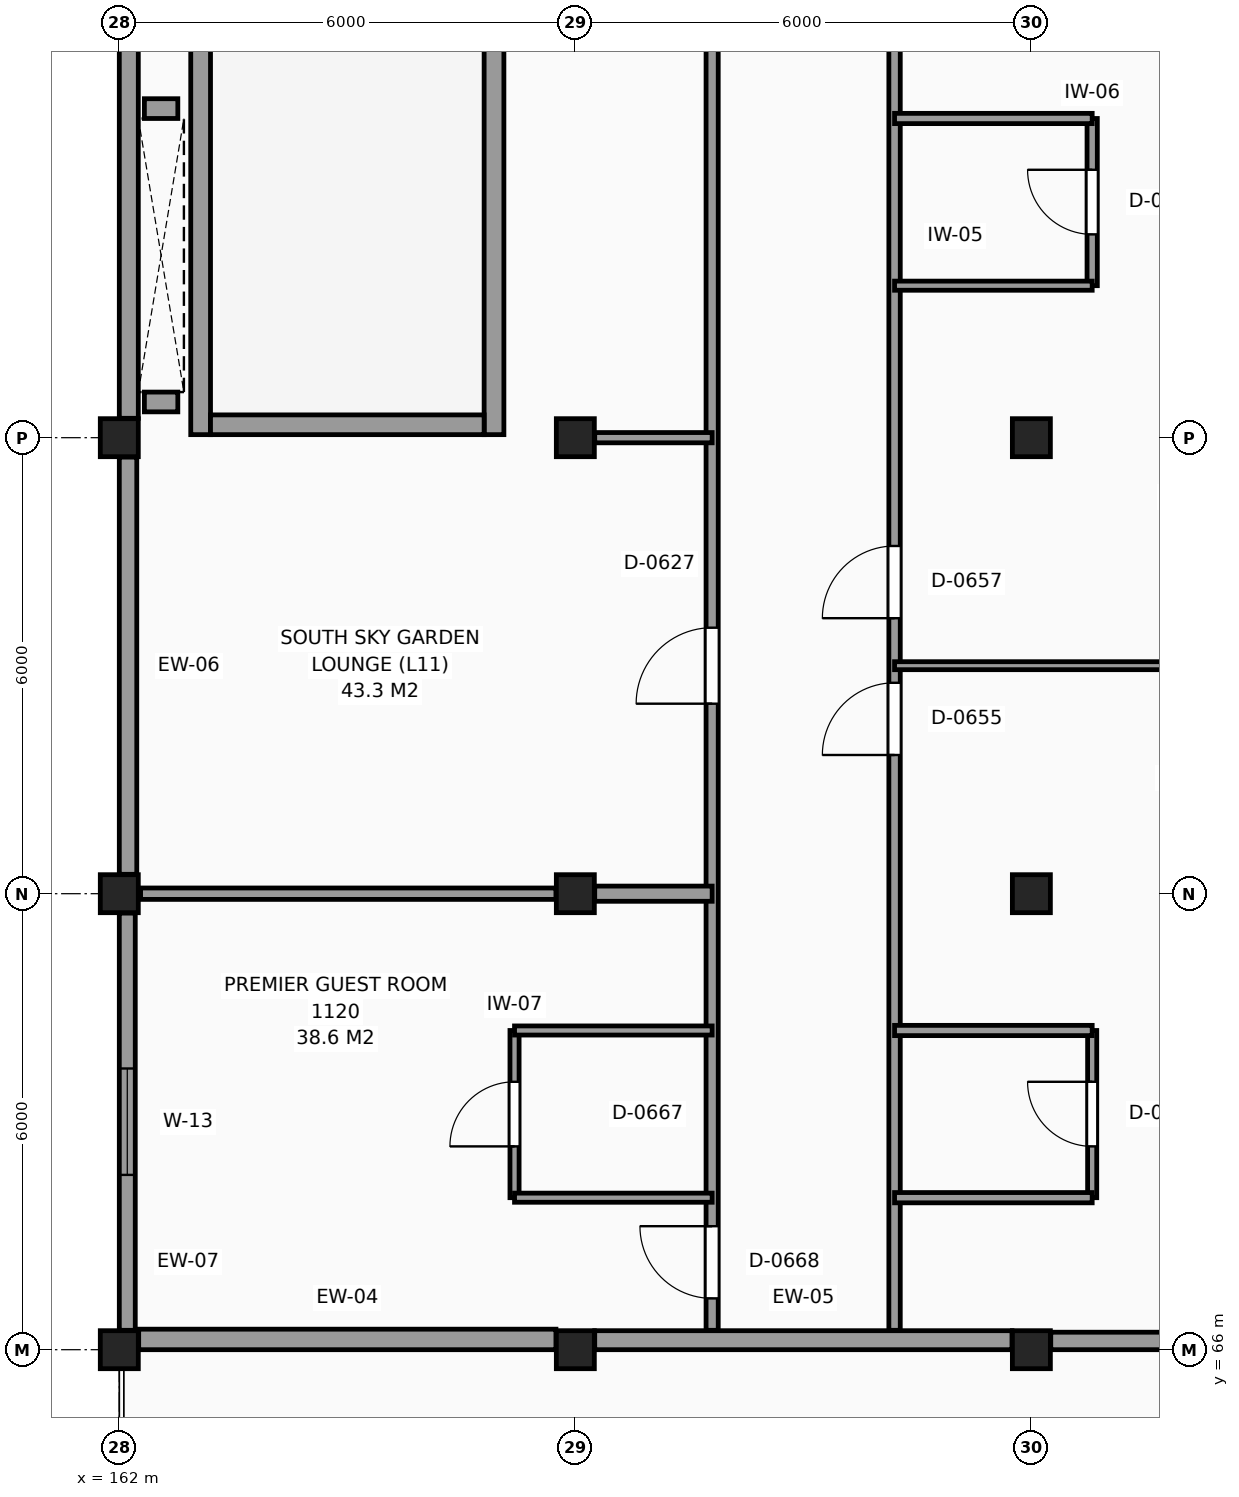
"""IFC4 building model, lengths in metres.
Left out: names, types, materials, properties, quantities, classifications, styles, units other than length and angle.
Written with IfcOpenShell. Run it as: python <this file> out.ifc"""

import sys

from ifc_helpers import new_model, si_unit, direction, frame, frame_2d, origin, origin_2d, place, context, subcontext, project, spatial, rectangle, extrude, element, fill, save


model = new_model("IFC4")
c1 = context("Model", 3, precision=1e-05, world=origin(), true_north=direction((0.0, 1.0)))
c2 = subcontext(c1, "Body", "Model", "MODEL_VIEW")
j1 = project(units=[si_unit("LENGTHUNIT", "METRE"), si_unit("PLANEANGLEUNIT", "RADIAN")], contexts=[c1])
p1 = place(None, origin())
s1 = spatial("IfcSite", under=j1, at=p1, CompositionType="ELEMENT")
p2 = place(p1, origin())
s2 = spatial("IfcBuilding", under=s1, at=p2, CompositionType="ELEMENT")
p3 = place(p2, frame((0.0, 0.0, 44.7)))
s3 = spatial("IfcBuildingStorey", under=s2, at=p3, CompositionType="ELEMENT", Elevation=44.7)
for number, where, z_axis, x_axis in (
    (1, (162.0, 66.0, 0.0), (0.0, 0.0, 1.0), (1.0, 0.0, 0.0)),
    (2, (162.0, 72.0, 0.0), (0.0, 0.0, 1.0), (1.0, 0.0, 0.0)),
    (3, (162.0, 78.0, 0.0), (0.0, 0.0, 1.0), (1.0, 0.0, 0.0)),
    (4, (168.0, 66.0, 0.0), (0.0, 0.0, 1.0), (1.0, 0.0, 0.0)),
    (5, (168.0, 72.0, 0.0), (0.0, 0.0, 1.0), (1.0, 0.0, 0.0)),
    (6, (168.0, 78.0, 0.0), (0.0, 0.0, 1.0), (1.0, 0.0, 0.0)),
    (7, (174.0, 66.0, 0.0), (0.0, 0.0, 1.0), (1.0, 0.0, 0.0)),
    (8, (174.0, 72.0, 0.0), (0.0, 0.0, 1.0), (1.0, 0.0, 0.0)),
    (9, (174.0, 78.0, 0.0), (0.0, 0.0, 1.0), (1.0, 0.0, 0.0)),
):
    element("IfcColumn", number, at=place(p3, frame(where, z_axis=z_axis, x_axis=x_axis)), inside=s3, PredefinedType="COLUMN", context=c2, shape_type="SweptSolid", body=[
        extrude(rectangle(XDim=0.5, YDim=0.5, at=origin_2d()), origin(), (0.0, 0.0, 1.0), 3.3),
    ])
p4 = place(p3, frame((162.125, 83.745, 0.0), z_axis=(0.0, 0.0, 1.0), x_axis=(0.0, -1.0, 0.0)))
e10 = element("IfcWall", 10, at=p4, inside=s3, PredefinedType="SOLIDWALL", context=c2, shape_type="SweptSolid", body=[
    extrude(rectangle(XDim=5.49, YDim=0.25, at=frame_2d((2.745, 0.0))), origin(), (0.0, 0.0, 1.0), 3.05),
])
p5 = place(p3, frame((162.115, 77.745, 0.0), z_axis=(0.0, 0.0, 1.0), x_axis=(0.0, -1.0, 0.0)))
e11 = element("IfcWall", 11, at=p5, inside=s3, PredefinedType="SOLIDWALL", context=c2, shape_type="SweptSolid", body=[
    extrude(rectangle(XDim=5.49, YDim=0.23, at=frame_2d((2.745, 0.0))), origin(), (0.0, 0.0, 1.0), 2.4),
])
p6 = place(p3, frame((162.105, 71.745, 0.0), z_axis=(0.0, 0.0, 1.0), x_axis=(0.0, -1.0, 0.0)))
e12 = element("IfcWall", 12, at=p6, inside=s3, PredefinedType="SOLIDWALL", context=c2, shape_type="SweptSolid", body=[
    extrude(rectangle(XDim=5.49, YDim=0.21, at=frame_2d((2.745, 0.0))), origin(), (0.0, 0.0, 1.0), 2.4),
])
p7 = place(p6, frame((2.045, 0.0, 0.8)))
e13 = element("IfcOpeningElement", 13, at=p7, cuts=e12, PredefinedType="OPENING", context=c2, shape_type="SweptSolid", body=[
    extrude(rectangle(XDim=1.4, YDim=1.4, at=frame_2d((0.7, 0.7))), frame((0.0, 0.115, 0.0), z_axis=(0.0, -1.0, 0.0), x_axis=(1.0, 0.0, 0.0)), (0.0, 0.0, 1.0), 0.23),
])
p8 = place(p3, frame((162.255, 66.135, 0.0), z_axis=(0.0, 0.0, 1.0), x_axis=(1.0, 0.0, 0.0)))
e14 = element("IfcWall", 14, at=p8, inside=s3, PredefinedType="SOLIDWALL", context=c2, shape_type="SweptSolid", body=[
    extrude(rectangle(XDim=5.49, YDim=0.27, at=frame_2d((2.745, 0.0))), origin(), (0.0, 0.0, 1.0), 2.25),
])
p9 = place(p3, frame((168.255, 66.125, 0.0), z_axis=(0.0, 0.0, 1.0), x_axis=(1.0, 0.0, 0.0)))
e15 = element("IfcWall", 15, at=p9, inside=s3, PredefinedType="SOLIDWALL", context=c2, shape_type="SweptSolid", body=[
    extrude(rectangle(XDim=5.49, YDim=0.25, at=frame_2d((2.745, 0.0))), origin(), (0.0, 0.0, 1.0), 2.25),
])
p10 = place(p3, frame((174.255, 66.115, 0.0), z_axis=(0.0, 0.0, 1.0), x_axis=(1.0, 0.0, 0.0)))
e16 = element("IfcWall", 16, at=p10, inside=s3, PredefinedType="SOLIDWALL", context=c2, shape_type="SweptSolid", body=[
    extrude(rectangle(XDim=5.49, YDim=0.23, at=frame_2d((2.745, 0.0))), origin(), (0.0, 0.0, 1.0), 2.25),
])
p11 = place(p10, frame((2.395, 0.0, 0.0)))
e17 = element("IfcOpeningElement", 17, at=p11, cuts=e16, PredefinedType="OPENING", context=c2, shape_type="SweptSolid", body=[
    extrude(rectangle(XDim=1.4, YDim=2.1, at=frame_2d((0.7, 1.05))), frame((0.0, 0.125, 0.0), z_axis=(0.0, -1.0, 0.0), x_axis=(1.0, 0.0, 0.0)), (0.0, 0.0, 1.0), 0.25),
])
for number, where, z_axis, x_axis in (
    (18, (163.07, 78.04, 0.0), (0.0, 0.0, 1.0), (0.0, 1.0, 0.0)),
    (19, (166.93, 78.04, 0.0), (0.0, 0.0, 1.0), (0.0, 1.0, 0.0)),
):
    element("IfcWall", number, at=place(p3, frame(where, z_axis=z_axis, x_axis=x_axis)), inside=s3, PredefinedType="SHEAR", context=c2, shape_type="SweptSolid", body=[
        extrude(rectangle(XDim=10.72, YDim=0.26, at=frame_2d((5.36, 0.0))), origin(), (0.0, 0.0, 1.0), 3.3),
    ])
p12 = place(p3, frame((163.2, 78.17, 0.0), z_axis=(0.0, 0.0, 1.0), x_axis=(1.0, 0.0, 0.0)))
e20 = element("IfcWall", 20, at=p12, inside=s3, PredefinedType="SHEAR", context=c2, shape_type="SweptSolid", body=[
    extrude(rectangle(XDim=3.6, YDim=0.26, at=frame_2d((1.8, 0.0))), origin(), (0.0, 0.0, 1.0), 3.3),
])
for number, where, z_axis, x_axis in (
    (21, (162.33, 78.47, 0.0), (0.0, 0.0, 1.0), (1.0, 0.0, 0.0)),
    (22, (162.33, 82.33, 0.0), (0.0, 0.0, 1.0), (1.0, 0.0, 0.0)),
):
    element("IfcWall", number, at=place(p3, frame(where, z_axis=z_axis, x_axis=x_axis)), inside=s3, PredefinedType="SHEAR", context=c2, shape_type="SweptSolid", body=[
        extrude(rectangle(XDim=0.44, YDim=0.26, at=frame_2d((0.22, 0.0))), origin(), (0.0, 0.0, 1.0), 3.3),
    ])
p13 = place(p3, frame((167.2, 68.0, 0.0), z_axis=(0.0, 0.0, 1.0), x_axis=(0.0, 1.0, 0.0)))
e23 = element("IfcWall", 23, at=p13, inside=s3, PredefinedType="PARTITIONING", context=c2, shape_type="SweptSolid", body=[
    extrude(rectangle(XDim=2.2, YDim=0.12, at=frame_2d((1.1, 0.0))), origin(), (0.0, 0.0, 1.0), 3.05),
])
p14 = place(p13, frame((0.675, 0.0, 0.0)))
e24 = element("IfcOpeningElement", 24, at=p14, cuts=e23, PredefinedType="OPENING", context=c2, shape_type="SweptSolid", body=[
    extrude(rectangle(XDim=0.85, YDim=2.1, at=frame_2d((0.425, 1.05))), frame((0.0, 0.07, 0.0), z_axis=(0.0, -1.0, 0.0), x_axis=(1.0, 0.0, 0.0)), (0.0, 0.0, 1.0), 0.14),
])
p15 = place(p3, frame((169.8, 66.255, 0.0), z_axis=(0.0, 0.0, 1.0), x_axis=(0.0, 1.0, 0.0)))
e25 = element("IfcWall", 25, at=p15, inside=s3, PredefinedType="PARTITIONING", context=c2, shape_type="SweptSolid", body=[
    extrude(rectangle(XDim=41.565, YDim=0.16, at=frame_2d((20.783, 0.0))), origin(), (0.0, 0.0, 1.0), 3.05),
])
p16 = place(p15, frame((26.145, 0.0, 0.0)))
e26 = element("IfcOpeningElement", 26, at=p16, cuts=e25, PredefinedType="OPENING", context=c2, shape_type="SweptSolid", body=[
    extrude(rectangle(XDim=1.2, YDim=2.2, at=frame_2d((0.6, 1.1))), frame((0.0, 0.09, 0.0), z_axis=(0.0, -1.0, 0.0), x_axis=(1.0, 0.0, 0.0)), (0.0, 0.0, 1.0), 0.18),
])
p17 = place(p15, frame((8.245, 0.0, 0.0)))
e27 = element("IfcOpeningElement", 27, at=p17, cuts=e25, PredefinedType="OPENING", context=c2, shape_type="SweptSolid", body=[
    extrude(rectangle(XDim=1.0, YDim=2.15, at=frame_2d((0.5, 1.075))), frame((0.0, 0.09, 0.0), z_axis=(0.0, -1.0, 0.0), x_axis=(1.0, 0.0, 0.0)), (0.0, 0.0, 1.0), 0.18),
])
p18 = place(p15, frame((0.42, 0.0, 0.0)))
e28 = element("IfcOpeningElement", 28, at=p18, cuts=e25, PredefinedType="OPENING", context=c2, shape_type="SweptSolid", body=[
    extrude(rectangle(XDim=0.95, YDim=2.1, at=frame_2d((0.475, 1.05))), frame((0.0, 0.09, 0.0), z_axis=(0.0, -1.0, 0.0), x_axis=(1.0, 0.0, 0.0)), (0.0, 0.0, 1.0), 0.18),
])
p19 = place(p15, frame((30.47, 0.0, 0.0)))
e29 = element("IfcOpeningElement", 29, at=p19, cuts=e25, PredefinedType="OPENING", context=c2, shape_type="SweptSolid", body=[
    extrude(rectangle(XDim=0.95, YDim=2.1, at=frame_2d((0.475, 1.05))), frame((0.0, 0.09, 0.0), z_axis=(0.0, -1.0, 0.0), x_axis=(1.0, 0.0, 0.0)), (0.0, 0.0, 1.0), 0.18),
])
p20 = place(p15, frame((36.47, 0.0, 0.0)))
e30 = element("IfcOpeningElement", 30, at=p20, cuts=e25, PredefinedType="OPENING", context=c2, shape_type="SweptSolid", body=[
    extrude(rectangle(XDim=0.95, YDim=2.1, at=frame_2d((0.475, 1.05))), frame((0.0, 0.09, 0.0), z_axis=(0.0, -1.0, 0.0), x_axis=(1.0, 0.0, 0.0)), (0.0, 0.0, 1.0), 0.18),
])
p21 = place(p3, frame((172.2, 66.255, 0.0), z_axis=(0.0, 0.0, 1.0), x_axis=(0.0, 1.0, 0.0)))
e31 = element("IfcWall", 31, at=p21, inside=s3, PredefinedType="PARTITIONING", context=c2, shape_type="SweptSolid", body=[
    extrude(rectangle(XDim=41.565, YDim=0.15, at=frame_2d((20.783, 0.0))), origin(), (0.0, 0.0, 1.0), 3.05),
])
p22 = place(p21, frame((7.57, 0.0, 0.0)))
e32 = element("IfcOpeningElement", 32, at=p22, cuts=e31, PredefinedType="OPENING", context=c2, shape_type="SweptSolid", body=[
    extrude(rectangle(XDim=0.95, YDim=2.1, at=frame_2d((0.475, 1.05))), frame((0.0, 0.085, 0.0), z_axis=(0.0, -1.0, 0.0), x_axis=(1.0, 0.0, 0.0)), (0.0, 0.0, 1.0), 0.17),
])
p23 = place(p21, frame((9.37, 0.0, 0.0)))
e33 = element("IfcOpeningElement", 33, at=p23, cuts=e31, PredefinedType="OPENING", context=c2, shape_type="SweptSolid", body=[
    extrude(rectangle(XDim=0.95, YDim=2.1, at=frame_2d((0.475, 1.05))), frame((0.0, 0.085, 0.0), z_axis=(0.0, -1.0, 0.0), x_axis=(1.0, 0.0, 0.0)), (0.0, 0.0, 1.0), 0.17),
])
p24 = place(p21, frame((18.47, 0.0, 0.0)))
e34 = element("IfcOpeningElement", 34, at=p24, cuts=e31, PredefinedType="OPENING", context=c2, shape_type="SweptSolid", body=[
    extrude(rectangle(XDim=0.95, YDim=2.1, at=frame_2d((0.475, 1.05))), frame((0.0, 0.085, 0.0), z_axis=(0.0, -1.0, 0.0), x_axis=(1.0, 0.0, 0.0)), (0.0, 0.0, 1.0), 0.17),
])
p25 = place(p21, frame((22.87, 0.0, 0.0)))
e35 = element("IfcOpeningElement", 35, at=p25, cuts=e31, PredefinedType="OPENING", context=c2, shape_type="SweptSolid", body=[
    extrude(rectangle(XDim=0.95, YDim=2.1, at=frame_2d((0.475, 1.05))), frame((0.0, 0.085, 0.0), z_axis=(0.0, -1.0, 0.0), x_axis=(1.0, 0.0, 0.0)), (0.0, 0.0, 1.0), 0.17),
])
p26 = place(p21, frame((30.07, 0.0, 0.0)))
e36 = element("IfcOpeningElement", 36, at=p26, cuts=e31, PredefinedType="OPENING", context=c2, shape_type="SweptSolid", body=[
    extrude(rectangle(XDim=0.95, YDim=2.1, at=frame_2d((0.475, 1.05))), frame((0.0, 0.085, 0.0), z_axis=(0.0, -1.0, 0.0), x_axis=(1.0, 0.0, 0.0)), (0.0, 0.0, 1.0), 0.17),
])
p27 = place(p21, frame((38.32, 0.0, 0.0)))
e37 = element("IfcOpeningElement", 37, at=p27, cuts=e31, PredefinedType="OPENING", context=c2, shape_type="SweptSolid", body=[
    extrude(rectangle(XDim=0.95, YDim=2.1, at=frame_2d((0.475, 1.05))), frame((0.0, 0.085, 0.0), z_axis=(0.0, -1.0, 0.0), x_axis=(1.0, 0.0, 0.0)), (0.0, 0.0, 1.0), 0.17),
])
p28 = place(p3, frame((174.8, 68.0, 0.0), z_axis=(0.0, 0.0, 1.0), x_axis=(0.0, 1.0, 0.0)))
e38 = element("IfcWall", 38, at=p28, inside=s3, PredefinedType="PARTITIONING", context=c2, shape_type="SweptSolid", body=[
    extrude(rectangle(XDim=2.2, YDim=0.12, at=frame_2d((1.1, 0.0))), origin(), (0.0, 0.0, 1.0), 3.05),
])
p29 = place(p28, frame((0.675, 0.0, 0.0)))
e39 = element("IfcOpeningElement", 39, at=p29, cuts=e38, PredefinedType="OPENING", context=c2, shape_type="SweptSolid", body=[
    extrude(rectangle(XDim=0.85, YDim=2.1, at=frame_2d((0.425, 1.05))), frame((0.0, 0.07, 0.0), z_axis=(0.0, -1.0, 0.0), x_axis=(1.0, 0.0, 0.0)), (0.0, 0.0, 1.0), 0.14),
])
p30 = place(p3, frame((174.8, 80.0, 0.0), z_axis=(0.0, 0.0, 1.0), x_axis=(0.0, 1.0, 0.0)))
e40 = element("IfcWall", 40, at=p30, inside=s3, PredefinedType="PARTITIONING", context=c2, shape_type="SweptSolid", body=[
    extrude(rectangle(XDim=2.2, YDim=0.135, at=frame_2d((1.1, 0.0))), origin(), (0.0, 0.0, 1.0), 3.05),
])
p31 = place(p30, frame((0.675, 0.0, 0.0)))
e41 = element("IfcOpeningElement", 41, at=p31, cuts=e40, PredefinedType="OPENING", context=c2, shape_type="SweptSolid", body=[
    extrude(rectangle(XDim=0.85, YDim=2.1, at=frame_2d((0.425, 1.05))), frame((0.0, 0.078, 0.0), z_axis=(0.0, -1.0, 0.0), x_axis=(1.0, 0.0, 0.0)), (0.0, 0.0, 1.0), 0.155),
])
p32 = place(p3, frame((167.2, 68.0, 0.0), z_axis=(0.0, 0.0, 1.0), x_axis=(1.0, 0.0, 0.0)))
e42 = element("IfcWall", 42, at=p32, inside=s3, PredefinedType="PARTITIONING", context=c2, shape_type="SweptSolid", body=[
    extrude(rectangle(XDim=2.6, YDim=0.12, at=frame_2d((1.3, 0.0))), origin(), (0.0, 0.0, 1.0), 3.05),
])
p33 = place(p3, frame((172.2, 68.0, 0.0), z_axis=(0.0, 0.0, 1.0), x_axis=(1.0, 0.0, 0.0)))
e43 = element("IfcWall", 43, at=p33, inside=s3, PredefinedType="PARTITIONING", context=c2, shape_type="SweptSolid", body=[
    extrude(rectangle(XDim=2.6, YDim=0.135, at=frame_2d((1.3, 0.0))), origin(), (0.0, 0.0, 1.0), 3.05),
])
p34 = place(p3, frame((167.2, 70.2, 0.0), z_axis=(0.0, 0.0, 1.0), x_axis=(1.0, 0.0, 0.0)))
e44 = element("IfcWall", 44, at=p34, inside=s3, PredefinedType="PARTITIONING", context=c2, shape_type="SweptSolid", body=[
    extrude(rectangle(XDim=2.6, YDim=0.12, at=frame_2d((1.3, 0.0))), origin(), (0.0, 0.0, 1.0), 3.05),
])
p35 = place(p3, frame((172.2, 70.2, 0.0), z_axis=(0.0, 0.0, 1.0), x_axis=(1.0, 0.0, 0.0)))
e45 = element("IfcWall", 45, at=p35, inside=s3, PredefinedType="PARTITIONING", context=c2, shape_type="SweptSolid", body=[
    extrude(rectangle(XDim=2.6, YDim=0.135, at=frame_2d((1.3, 0.0))), origin(), (0.0, 0.0, 1.0), 3.05),
])
p36 = place(p3, frame((162.28, 72.0, 0.0), z_axis=(0.0, 0.0, 1.0), x_axis=(1.0, 0.0, 0.0)))
e46 = element("IfcWall", 46, at=p36, inside=s3, PredefinedType="PARTITIONING", context=c2, shape_type="SweptSolid", body=[
    extrude(rectangle(XDim=5.465, YDim=0.15, at=frame_2d((2.732, 0.0))), origin(), (0.0, 0.0, 1.0), 2.25),
])
p37 = place(p3, frame((168.255, 72.0, 0.0), z_axis=(0.0, 0.0, 1.0), x_axis=(1.0, 0.0, 0.0)))
e47 = element("IfcWall", 47, at=p37, inside=s3, PredefinedType="PARTITIONING", context=c2, shape_type="SweptSolid", body=[
    extrude(rectangle(XDim=1.545, YDim=0.2, at=frame_2d((0.772, 0.0))), origin(), (0.0, 0.0, 1.0), 2.25),
])
p38 = place(p3, frame((172.2, 75.0, 0.0), z_axis=(0.0, 0.0, 1.0), x_axis=(1.0, 0.0, 0.0)))
e48 = element("IfcWall", 48, at=p38, inside=s3, PredefinedType="PARTITIONING", context=c2, shape_type="SweptSolid", body=[
    extrude(rectangle(XDim=7.565, YDim=0.105, at=frame_2d((3.782, 0.0))), origin(), (0.0, 0.0, 1.0), 3.05),
])
p39 = place(p3, frame((168.255, 78.0, 0.0), z_axis=(0.0, 0.0, 1.0), x_axis=(1.0, 0.0, 0.0)))
e49 = element("IfcWall", 49, at=p39, inside=s3, PredefinedType="PARTITIONING", context=c2, shape_type="SweptSolid", body=[
    extrude(rectangle(XDim=1.545, YDim=0.135, at=frame_2d((0.772, 0.0))), origin(), (0.0, 0.0, 1.0), 2.25),
])
p40 = place(p3, frame((172.2, 80.0, 0.0), z_axis=(0.0, 0.0, 1.0), x_axis=(1.0, 0.0, 0.0)))
e50 = element("IfcWall", 50, at=p40, inside=s3, PredefinedType="PARTITIONING", context=c2, shape_type="SweptSolid", body=[
    extrude(rectangle(XDim=2.6, YDim=0.12, at=frame_2d((1.3, 0.0))), origin(), (0.0, 0.0, 1.0), 3.05),
])
p41 = place(p3, frame((172.2, 82.2, 0.0), z_axis=(0.0, 0.0, 1.0), x_axis=(1.0, 0.0, 0.0)))
e51 = element("IfcWall", 51, at=p41, inside=s3, PredefinedType="PARTITIONING", context=c2, shape_type="SweptSolid", body=[
    extrude(rectangle(XDim=2.6, YDim=0.135, at=frame_2d((1.3, 0.0))), origin(), (0.0, 0.0, 1.0), 3.05),
])
p42 = place(p7, origin())
e52 = element("IfcWindow", 52, at=p42, inside=s3, PartitioningType="SINGLE_PANEL", PredefinedType="WINDOW", context=c2, shape_type="SweptSolid", body=[
    extrude(rectangle(XDim=1.4, YDim=1.4, at=frame_2d((0.7, 0.7))), frame((0.0, 0.03, 0.0), z_axis=(0.0, -1.0, 0.0), x_axis=(1.0, 0.0, 0.0)), (0.0, 0.0, 1.0), 0.06),
])
fill(e13, e52)
p43 = place(p17, origin())
e53 = element("IfcDoor", 53, at=p43, inside=s3, OperationType="SINGLE_SWING_LEFT", PredefinedType="DOOR", context=c2, shape_type="SweptSolid", body=[
    extrude(rectangle(XDim=1.0, YDim=2.15, at=frame_2d((0.5, 1.075))), frame((0.0, 0.025, 0.0), z_axis=(0.0, -1.0, 0.0), x_axis=(1.0, 0.0, 0.0)), (0.0, 0.0, 1.0), 0.05),
])
fill(e27, e53)
p44 = place(p29, origin())
e54 = element("IfcDoor", 54, at=p44, inside=s3, OperationType="SINGLE_SWING_RIGHT", PredefinedType="DOOR", context=c2, shape_type="SweptSolid", body=[
    extrude(rectangle(XDim=0.85, YDim=2.1, at=frame_2d((0.425, 1.05))), frame((0.0, 0.025, 0.0), z_axis=(0.0, -1.0, 0.0), x_axis=(1.0, 0.0, 0.0)), (0.0, 0.0, 1.0), 0.05),
])
fill(e39, e54)
p45 = place(p22, origin())
e55 = element("IfcDoor", 55, at=p45, inside=s3, OperationType="SINGLE_SWING_LEFT", PredefinedType="DOOR", context=c2, shape_type="SweptSolid", body=[
    extrude(rectangle(XDim=0.95, YDim=2.1, at=frame_2d((0.475, 1.05))), frame((0.0, 0.025, 0.0), z_axis=(0.0, -1.0, 0.0), x_axis=(1.0, 0.0, 0.0)), (0.0, 0.0, 1.0), 0.05),
])
fill(e32, e55)
p46 = place(p31, origin())
e56 = element("IfcDoor", 56, at=p46, inside=s3, OperationType="SINGLE_SWING_RIGHT", PredefinedType="DOOR", context=c2, shape_type="SweptSolid", body=[
    extrude(rectangle(XDim=0.85, YDim=2.1, at=frame_2d((0.425, 1.05))), frame((0.0, 0.025, 0.0), z_axis=(0.0, -1.0, 0.0), x_axis=(1.0, 0.0, 0.0)), (0.0, 0.0, 1.0), 0.05),
])
fill(e41, e56)
p47 = place(p23, origin())
e57 = element("IfcDoor", 57, at=p47, inside=s3, OperationType="SINGLE_SWING_LEFT", PredefinedType="DOOR", context=c2, shape_type="SweptSolid", body=[
    extrude(rectangle(XDim=0.95, YDim=2.1, at=frame_2d((0.475, 1.05))), frame((0.0, 0.025, 0.0), z_axis=(0.0, -1.0, 0.0), x_axis=(1.0, 0.0, 0.0)), (0.0, 0.0, 1.0), 0.05),
])
fill(e33, e57)
p48 = place(p14, origin())
e58 = element("IfcDoor", 58, at=p48, inside=s3, OperationType="SINGLE_SWING_LEFT", PredefinedType="DOOR", context=c2, shape_type="SweptSolid", body=[
    extrude(rectangle(XDim=0.85, YDim=2.1, at=frame_2d((0.425, 1.05))), frame((0.0, 0.025, 0.0), z_axis=(0.0, -1.0, 0.0), x_axis=(1.0, 0.0, 0.0)), (0.0, 0.0, 1.0), 0.05),
])
fill(e24, e58)
p49 = place(p18, origin())
e59 = element("IfcDoor", 59, at=p49, inside=s3, OperationType="SINGLE_SWING_RIGHT", PredefinedType="DOOR", context=c2, shape_type="SweptSolid", body=[
    extrude(rectangle(XDim=0.95, YDim=2.1, at=frame_2d((0.475, 1.05))), frame((0.0, 0.025, 0.0), z_axis=(0.0, -1.0, 0.0), x_axis=(1.0, 0.0, 0.0)), (0.0, 0.0, 1.0), 0.05),
])
fill(e28, e59)
save(model, sys.argv[1])
